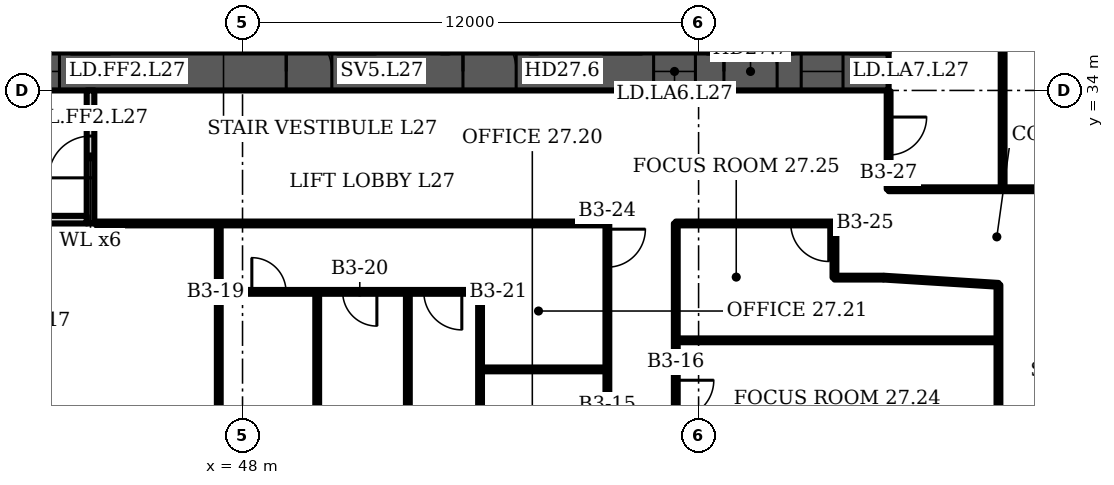
"""IFC4 building model, lengths in metres.
Left out: names, types, materials, properties, quantities, classifications, styles, units other than length and angle.
Written with IfcOpenShell. Run it as: python <this file> out.ifc"""

import sys

from ifc_helpers import new_model, si_unit, direction, frame, frame_2d, origin, place, context, subcontext, project, spatial, rectangle, extrude, element, fill, save


model = new_model("IFC4")
c1 = context("Model", 3, precision=1e-05, world=origin(), true_north=direction((0.0, 1.0)))
c2 = subcontext(c1, "Body", "Model", "MODEL_VIEW")
j1 = project(units=[si_unit("LENGTHUNIT", "METRE"), si_unit("PLANEANGLEUNIT", "RADIAN")], contexts=[c1])
p1 = place(None, origin())
s1 = spatial("IfcSite", under=j1, at=p1, CompositionType="ELEMENT")
p2 = place(p1, origin())
s2 = spatial("IfcBuilding", under=s1, at=p2, CompositionType="ELEMENT")
p3 = place(p2, frame((0.0, 0.0, 118.3)))
s3 = spatial("IfcBuildingStorey", under=s2, at=p3, CompositionType="ELEMENT", Elevation=118.3)
p4 = place(p3, frame((16.0, 34.5, 0.0), z_axis=(0.0, 0.0, 1.0), x_axis=(1.0, 0.0, 0.0)))
e1 = element("IfcWall", 1, at=p4, inside=s3, PredefinedType="SHEAR", context=c2, shape_type="SweptSolid", body=[
    extrude(rectangle(XDim=49.0, YDim=1.0, at=frame_2d((24.5, 0.0))), origin(), (0.0, 0.0, 1.0), 3.6),
])
p5 = place(p4, frame((1.2, 0.0, 0.0)))
e2 = element("IfcOpeningElement", 2, at=p5, cuts=e1, PredefinedType="OPENING", context=c2, shape_type="SweptSolid", body=[
    extrude(rectangle(XDim=1.1, YDim=2.1, at=frame_2d((0.55, 1.05))), frame((0.0, 0.51, 0.0), z_axis=(0.0, -1.0, 0.0), x_axis=(1.0, 0.0, 0.0)), (0.0, 0.0, 1.0), 1.02),
])
p6 = place(p4, frame((5.083, 0.0, 0.0)))
e3 = element("IfcOpeningElement", 3, at=p6, cuts=e1, PredefinedType="OPENING", context=c2, shape_type="SweptSolid", body=[
    extrude(rectangle(XDim=1.1, YDim=2.1, at=frame_2d((0.55, 1.05))), frame((0.0, 0.51, 0.0), z_axis=(0.0, -1.0, 0.0), x_axis=(1.0, 0.0, 0.0)), (0.0, 0.0, 1.0), 1.02),
])
p7 = place(p4, frame((2.933, 0.0, 0.0)))
e4 = element("IfcOpeningElement", 4, at=p7, cuts=e1, PredefinedType="OPENING", context=c2, shape_type="SweptSolid", body=[
    extrude(rectangle(XDim=1.4, YDim=2.1, at=frame_2d((0.7, 1.05))), frame((0.0, 0.51, 0.0), z_axis=(0.0, -1.0, 0.0), x_axis=(1.0, 0.0, 0.0)), (0.0, 0.0, 1.0), 1.02),
])
p8 = place(p4, frame((7.65, 0.0, 0.0)))
e5 = element("IfcOpeningElement", 5, at=p8, cuts=e1, PredefinedType="OPENING", context=c2, shape_type="SweptSolid", body=[
    extrude(rectangle(XDim=1.2, YDim=2.1, at=frame_2d((0.6, 1.05))), frame((0.0, 0.51, 0.0), z_axis=(0.0, -1.0, 0.0), x_axis=(1.0, 0.0, 0.0)), (0.0, 0.0, 1.0), 1.02),
])
p9 = place(p4, frame((14.817, 0.0, 0.0)))
e6 = element("IfcOpeningElement", 6, at=p9, cuts=e1, PredefinedType="OPENING", context=c2, shape_type="SweptSolid", body=[
    extrude(rectangle(XDim=1.1, YDim=2.1, at=frame_2d((0.55, 1.05))), frame((0.0, 0.51, 0.0), z_axis=(0.0, -1.0, 0.0), x_axis=(1.0, 0.0, 0.0)), (0.0, 0.0, 1.0), 1.02),
])
p10 = place(p4, frame((19.083, 0.0, 0.0)))
e7 = element("IfcOpeningElement", 7, at=p10, cuts=e1, PredefinedType="OPENING", context=c2, shape_type="SweptSolid", body=[
    extrude(rectangle(XDim=1.1, YDim=2.1, at=frame_2d((0.55, 1.05))), frame((0.0, 0.51, 0.0), z_axis=(0.0, -1.0, 0.0), x_axis=(1.0, 0.0, 0.0)), (0.0, 0.0, 1.0), 1.02),
])
p11 = place(p4, frame((16.8, 0.0, 0.0)))
e8 = element("IfcOpeningElement", 8, at=p11, cuts=e1, PredefinedType="OPENING", context=c2, shape_type="SweptSolid", body=[
    extrude(rectangle(XDim=1.4, YDim=2.1, at=frame_2d((0.7, 1.05))), frame((0.0, 0.51, 0.0), z_axis=(0.0, -1.0, 0.0), x_axis=(1.0, 0.0, 0.0)), (0.0, 0.0, 1.0), 1.02),
])
p12 = place(p4, frame((21.817, 0.0, 0.0)))
e9 = element("IfcOpeningElement", 9, at=p12, cuts=e1, PredefinedType="OPENING", context=c2, shape_type="SweptSolid", body=[
    extrude(rectangle(XDim=1.1, YDim=2.1, at=frame_2d((0.55, 1.05))), frame((0.0, 0.51, 0.0), z_axis=(0.0, -1.0, 0.0), x_axis=(1.0, 0.0, 0.0)), (0.0, 0.0, 1.0), 1.02),
])
p13 = place(p4, frame((26.083, 0.0, 0.0)))
e10 = element("IfcOpeningElement", 10, at=p13, cuts=e1, PredefinedType="OPENING", context=c2, shape_type="SweptSolid", body=[
    extrude(rectangle(XDim=1.1, YDim=2.1, at=frame_2d((0.55, 1.05))), frame((0.0, 0.51, 0.0), z_axis=(0.0, -1.0, 0.0), x_axis=(1.0, 0.0, 0.0)), (0.0, 0.0, 1.0), 1.02),
])
p14 = place(p4, frame((33.15, 0.0, 0.0)))
e11 = element("IfcOpeningElement", 11, at=p14, cuts=e1, PredefinedType="OPENING", context=c2, shape_type="SweptSolid", body=[
    extrude(rectangle(XDim=1.2, YDim=2.1, at=frame_2d((0.6, 1.05))), frame((0.0, 0.51, 0.0), z_axis=(0.0, -1.0, 0.0), x_axis=(1.0, 0.0, 0.0)), (0.0, 0.0, 1.0), 1.02),
])
p15 = place(p4, frame((37.8, 0.0, 0.0)))
e12 = element("IfcOpeningElement", 12, at=p15, cuts=e1, PredefinedType="OPENING", context=c2, shape_type="SweptSolid", body=[
    extrude(rectangle(XDim=1.4, YDim=2.1, at=frame_2d((0.7, 1.05))), frame((0.0, 0.51, 0.0), z_axis=(0.0, -1.0, 0.0), x_axis=(1.0, 0.0, 0.0)), (0.0, 0.0, 1.0), 1.02),
])
p16 = place(p4, frame((42.817, 0.0, 0.0)))
e13 = element("IfcOpeningElement", 13, at=p16, cuts=e1, PredefinedType="OPENING", context=c2, shape_type="SweptSolid", body=[
    extrude(rectangle(XDim=1.1, YDim=2.1, at=frame_2d((0.55, 1.05))), frame((0.0, 0.51, 0.0), z_axis=(0.0, -1.0, 0.0), x_axis=(1.0, 0.0, 0.0)), (0.0, 0.0, 1.0), 1.02),
])
p17 = place(p4, frame((46.7, 0.0, 0.0)))
e14 = element("IfcOpeningElement", 14, at=p17, cuts=e1, PredefinedType="OPENING", context=c2, shape_type="SweptSolid", body=[
    extrude(rectangle(XDim=1.1, YDim=2.1, at=frame_2d((0.55, 1.05))), frame((0.0, 0.51, 0.0), z_axis=(0.0, -1.0, 0.0), x_axis=(1.0, 0.0, 0.0)), (0.0, 0.0, 1.0), 1.02),
])
p18 = place(p4, frame((44.667, 0.0, 0.0)))
e15 = element("IfcOpeningElement", 15, at=p18, cuts=e1, PredefinedType="OPENING", context=c2, shape_type="SweptSolid", body=[
    extrude(rectangle(XDim=1.4, YDim=2.1, at=frame_2d((0.7, 1.05))), frame((0.0, 0.51, 0.0), z_axis=(0.0, -1.0, 0.0), x_axis=(1.0, 0.0, 0.0)), (0.0, 0.0, 1.0), 1.02),
])
p19 = place(p3, frame((44.0, 30.5, 0.0), z_axis=(0.0, 0.0, 1.0), x_axis=(0.0, 1.0, 0.0)))
e16 = element("IfcWall", 16, at=p19, inside=s3, PredefinedType="PARTITIONING", context=c2, shape_type="SweptSolid", body=[
    extrude(rectangle(XDim=3.5, YDim=0.2, at=frame_2d((1.75, 0.0))), origin(), (0.0, 0.0, 1.0), 3.2),
])
p20 = place(p19, frame((1.2, 0.0, 0.0)))
e17 = element("IfcOpeningElement", 17, at=p20, cuts=e16, PredefinedType="OPENING", context=c2, shape_type="SweptSolid", body=[
    extrude(rectangle(XDim=1.1, YDim=2.1, at=frame_2d((0.55, 1.05))), frame((0.0, 0.11, 0.0), z_axis=(0.0, -1.0, 0.0), x_axis=(1.0, 0.0, 0.0)), (0.0, 0.0, 1.0), 0.22),
])
p21 = place(p3, frame((41.1, 30.6, 0.0), z_axis=(0.0, 0.0, 1.0), x_axis=(1.0, 0.0, 0.0)))
e18 = element("IfcWall", 18, at=p21, inside=s3, PredefinedType="PARTITIONING", context=c2, shape_type="SweptSolid", body=[
    extrude(rectangle(XDim=2.8, YDim=0.2, at=frame_2d((1.4, 0.0))), origin(), (0.0, 0.0, 1.0), 3.2),
])
p22 = place(p3, frame((47.375, 15.13, 0.0), z_axis=(0.0, 0.0, 1.0), x_axis=(0.0, 1.0, 0.0)))
e19 = element("IfcWall", 19, at=p22, inside=s3, PredefinedType="PARTITIONING", context=c2, shape_type="SweptSolid", body=[
    extrude(rectangle(XDim=15.36, YDim=0.1, at=frame_2d((7.68, 0.0))), origin(), (0.0, 0.0, 1.0), 3.2),
])
p23 = place(p3, frame((47.375, 28.7, 0.0), z_axis=(0.0, 0.0, 1.0), x_axis=(1.0, 0.0, 0.0)))
e20 = element("IfcWall", 20, at=p23, inside=s3, PredefinedType="PARTITIONING", context=c2, shape_type="SweptSolid", body=[
    extrude(rectangle(XDim=6.875, YDim=0.1, at=frame_2d((3.438, 0.0))), origin(), (0.0, 0.0, 1.0), 3.2),
])
p24 = place(p23, frame((0.87, 0.0, 0.0)))
e21 = element("IfcOpeningElement", 21, at=p24, cuts=e20, PredefinedType="OPENING", context=c2, shape_type="SweptSolid", body=[
    extrude(rectangle(XDim=0.9, YDim=2.1, at=frame_2d((0.45, 1.05))), frame((0.0, 0.06, 0.0), z_axis=(0.0, -1.0, 0.0), x_axis=(1.0, 0.0, 0.0)), (0.0, 0.0, 1.0), 0.12),
])
p25 = place(p23, frame((3.26, 0.0, 0.0)))
e22 = element("IfcOpeningElement", 22, at=p25, cuts=e20, PredefinedType="OPENING", context=c2, shape_type="SweptSolid", body=[
    extrude(rectangle(XDim=0.9, YDim=2.1, at=frame_2d((0.45, 1.05))), frame((0.0, 0.06, 0.0), z_axis=(0.0, -1.0, 0.0), x_axis=(1.0, 0.0, 0.0)), (0.0, 0.0, 1.0), 0.12),
])
p26 = place(p23, frame((5.395, 0.0, 0.0)))
e23 = element("IfcOpeningElement", 23, at=p26, cuts=e20, PredefinedType="OPENING", context=c2, shape_type="SweptSolid", body=[
    extrude(rectangle(XDim=1.0, YDim=2.1, at=frame_2d((0.5, 1.05))), frame((0.0, 0.06, 0.0), z_axis=(0.0, -1.0, 0.0), x_axis=(1.0, 0.0, 0.0)), (0.0, 0.0, 1.0), 0.12),
])
for number, where, z_axis, x_axis in (
    (24, (49.965, 15.13, 0.0), (0.0, 0.0, 1.0), (0.0, 1.0, 0.0)),
    (25, (52.35, 15.13, 0.0), (0.0, 0.0, 1.0), (0.0, 1.0, 0.0)),
    (26, (54.25, 15.13, 0.0), (0.0, 0.0, 1.0), (0.0, 1.0, 0.0)),
):
    element("IfcWall", number, at=place(p3, frame(where, z_axis=z_axis, x_axis=x_axis)), inside=s3, PredefinedType="PARTITIONING", context=c2, shape_type="SweptSolid", body=[
        extrude(rectangle(XDim=13.57, YDim=0.1, at=frame_2d((6.785, 0.0))), origin(), (0.0, 0.0, 1.0), 3.2),
    ])
p27 = place(p3, frame((54.25, 26.66, 0.0), z_axis=(0.0, 0.0, 1.0), x_axis=(1.0, 0.0, 0.0)))
e27 = element("IfcWall", 27, at=p27, inside=s3, PredefinedType="PARTITIONING", context=c2, shape_type="SweptSolid", body=[
    extrude(rectangle(XDim=3.35, YDim=0.1, at=frame_2d((1.675, 0.0))), origin(), (0.0, 0.0, 1.0), 3.2),
])
p28 = place(p3, frame((57.6, -0.79, 0.0), z_axis=(0.0, 0.0, 1.0), x_axis=(0.0, 1.0, 0.0)))
e28 = element("IfcWall", 28, at=p28, inside=s3, PredefinedType="PARTITIONING", context=c2, shape_type="SweptSolid", body=[
    extrude(rectangle(XDim=31.29, YDim=0.1, at=frame_2d((15.645, 0.0))), origin(), (0.0, 0.0, 1.0), 2.58),
])
p29 = place(p28, frame((7.5, 0.0, 0.0)))
e29 = element("IfcOpeningElement", 29, at=p29, cuts=e28, PredefinedType="OPENING", context=c2, shape_type="SweptSolid", body=[
    extrude(rectangle(XDim=1.0, YDim=2.1, at=frame_2d((0.5, 1.05))), frame((0.0, 0.06, 0.0), z_axis=(0.0, -1.0, 0.0), x_axis=(1.0, 0.0, 0.0)), (0.0, 0.0, 1.0), 0.12),
])
p30 = place(p28, frame((17.344, 0.0, 0.0)))
e30 = element("IfcOpeningElement", 30, at=p30, cuts=e28, PredefinedType="OPENING", context=c2, shape_type="SweptSolid", body=[
    extrude(rectangle(XDim=1.0, YDim=2.1, at=frame_2d((0.5, 1.05))), frame((0.0, 0.06, 0.0), z_axis=(0.0, -1.0, 0.0), x_axis=(1.0, 0.0, 0.0)), (0.0, 0.0, 1.0), 0.12),
])
p31 = place(p28, frame((21.185, 0.0, 0.0)))
e31 = element("IfcOpeningElement", 31, at=p31, cuts=e28, PredefinedType="OPENING", context=c2, shape_type="SweptSolid", body=[
    extrude(rectangle(XDim=1.0, YDim=2.1, at=frame_2d((0.5, 1.05))), frame((0.0, 0.06, 0.0), z_axis=(0.0, -1.0, 0.0), x_axis=(1.0, 0.0, 0.0)), (0.0, 0.0, 1.0), 0.12),
])
p32 = place(p28, frame((25.03, 0.0, 0.0)))
e32 = element("IfcOpeningElement", 32, at=p32, cuts=e28, PredefinedType="OPENING", context=c2, shape_type="SweptSolid", body=[
    extrude(rectangle(XDim=1.0, YDim=2.1, at=frame_2d((0.5, 1.05))), frame((0.0, 0.06, 0.0), z_axis=(0.0, -1.0, 0.0), x_axis=(1.0, 0.0, 0.0)), (0.0, 0.0, 1.0), 0.12),
])
p33 = place(p28, frame((30.139, 0.0, 0.0)))
e33 = element("IfcOpeningElement", 33, at=p33, cuts=e28, PredefinedType="OPENING", context=c2, shape_type="SweptSolid", body=[
    extrude(rectangle(XDim=1.0, YDim=2.1, at=frame_2d((0.5, 1.05))), frame((0.0, 0.06, 0.0), z_axis=(0.0, -1.0, 0.0), x_axis=(1.0, 0.0, 0.0)), (0.0, 0.0, 1.0), 0.12),
])
p34 = place(p3, frame((59.4, 13.7, 0.0), z_axis=(0.0, 0.0, 1.0), x_axis=(0.0, 1.0, 0.0)))
e34 = element("IfcWall", 34, at=p34, inside=s3, PredefinedType="PARTITIONING", context=c2, shape_type="SweptSolid", body=[
    extrude(rectangle(XDim=16.8, YDim=0.1, at=frame_2d((8.4, 0.0))), origin(), (0.0, 0.0, 1.0), 3.2),
])
p35 = place(p34, frame((2.45, 0.0, 0.0)))
e35 = element("IfcOpeningElement", 35, at=p35, cuts=e34, PredefinedType="OPENING", context=c2, shape_type="SweptSolid", body=[
    extrude(rectangle(XDim=1.0, YDim=2.1, at=frame_2d((0.5, 1.05))), frame((0.0, 0.06, 0.0), z_axis=(0.0, -1.0, 0.0), x_axis=(1.0, 0.0, 0.0)), (0.0, 0.0, 1.0), 0.12),
])
p36 = place(p34, frame((7.125, 0.0, 0.0)))
e36 = element("IfcOpeningElement", 36, at=p36, cuts=e34, PredefinedType="OPENING", context=c2, shape_type="SweptSolid", body=[
    extrude(rectangle(XDim=1.0, YDim=2.1, at=frame_2d((0.5, 1.05))), frame((0.0, 0.06, 0.0), z_axis=(0.0, -1.0, 0.0), x_axis=(1.0, 0.0, 0.0)), (0.0, 0.0, 1.0), 0.12),
])
p37 = place(p34, frame((11.675, 0.0, 0.0)))
e37 = element("IfcOpeningElement", 37, at=p37, cuts=e34, PredefinedType="OPENING", context=c2, shape_type="SweptSolid", body=[
    extrude(rectangle(XDim=1.0, YDim=2.1, at=frame_2d((0.5, 1.05))), frame((0.0, 0.06, 0.0), z_axis=(0.0, -1.0, 0.0), x_axis=(1.0, 0.0, 0.0)), (0.0, 0.0, 1.0), 0.12),
])
p38 = place(p3, frame((59.4, 27.425, 0.0), z_axis=(0.0, 0.0, 1.0), x_axis=(1.0, 0.0, 0.0)))
e38 = element("IfcWall", 38, at=p38, inside=s3, PredefinedType="PARTITIONING", context=c2, shape_type="SweptSolid", body=[
    extrude(rectangle(XDim=8.49, YDim=0.1, at=frame_2d((4.245, 0.0))), origin(), (0.0, 0.0, 1.0), 3.2),
])
p39 = place(p3, frame((59.4, 30.5, 0.0), z_axis=(0.0, 0.0, 1.0), x_axis=(1.0, 0.0, 0.0)))
e39 = element("IfcWall", 39, at=p39, inside=s3, PredefinedType="PARTITIONING", context=c2, shape_type="SweptSolid", body=[
    extrude(rectangle(XDim=4.175, YDim=0.1, at=frame_2d((2.087, 0.0))), origin(), (0.0, 0.0, 1.0), 3.2),
])
p40 = place(p39, frame((3.025, 0.0, 0.0)))
e40 = element("IfcOpeningElement", 40, at=p40, cuts=e39, PredefinedType="OPENING", context=c2, shape_type="SweptSolid", body=[
    extrude(rectangle(XDim=1.0, YDim=2.1, at=frame_2d((0.5, 1.05))), frame((0.0, 0.06, 0.0), z_axis=(0.0, -1.0, 0.0), x_axis=(1.0, 0.0, 0.0)), (0.0, 0.0, 1.0), 0.12),
])
p41 = place(p3, frame((63.575, 29.075, 0.0), z_axis=(0.0, 0.0, 1.0), x_axis=(0.0, 1.0, 0.0)))
e41 = element("IfcWall", 41, at=p41, inside=s3, PredefinedType="PARTITIONING", context=c2, shape_type="SweptSolid", body=[
    extrude(rectangle(XDim=1.425, YDim=0.1, at=frame_2d((0.712, 0.0))), origin(), (0.0, 0.0, 1.0), 3.2),
])
p42 = place(p3, frame((63.575, 29.075, 0.0), z_axis=(0.0, 0.0, 1.0), x_axis=(1.0, 0.0, 0.0)))
e42 = element("IfcWall", 42, at=p42, inside=s3, PredefinedType="PARTITIONING", context=c2, shape_type="SweptSolid", body=[
    extrude(rectangle(XDim=1.285, YDim=0.1, at=frame_2d((0.643, 0.0))), origin(), (0.0, 0.0, 1.0), 3.2),
])
p43 = place(p3, frame((65.0, 31.4, 0.0), z_axis=(0.0, 0.0, 1.0), x_axis=(0.0, 1.0, 0.0)))
e43 = element("IfcWall", 43, at=p43, inside=s3, PredefinedType="PARTITIONING", context=c2, shape_type="SweptSolid", body=[
    extrude(rectangle(XDim=2.58, YDim=0.1, at=frame_2d((1.29, 0.0))), origin(), (0.0, 0.0, 1.0), 3.2),
])
p44 = place(p43, frame((0.9, 0.0, 0.0)))
e44 = element("IfcOpeningElement", 44, at=p44, cuts=e43, PredefinedType="OPENING", context=c2, shape_type="SweptSolid", body=[
    extrude(rectangle(XDim=1.0, YDim=2.1, at=frame_2d((0.5, 1.05))), frame((0.0, 0.06, 0.0), z_axis=(0.0, -1.0, 0.0), x_axis=(1.0, 0.0, 0.0)), (0.0, 0.0, 1.0), 0.12),
])
p45 = place(p3, frame((65.0, 31.4, 0.0), z_axis=(0.0, 0.0, 1.0), x_axis=(1.0, 0.0, 0.0)))
e45 = element("IfcWall", 45, at=p45, inside=s3, PredefinedType="PARTITIONING", context=c2, shape_type="SweptSolid", body=[
    extrude(rectangle(XDim=4.69, YDim=0.1, at=frame_2d((2.345, 0.0))), origin(), (0.0, 0.0, 1.0), 3.2),
])
p46 = place(p3, frame((67.89, 24.4, 0.0), z_axis=(0.0, 0.0, 1.0), x_axis=(0.0, 1.0, 0.0)))
e46 = element("IfcWall", 46, at=p46, inside=s3, PredefinedType="PARTITIONING", context=c2, shape_type="SweptSolid", body=[
    extrude(rectangle(XDim=4.485, YDim=0.1, at=frame_2d((2.243, 0.0))), origin(), (0.0, 0.0, 1.0), 3.2),
])
p47 = place(p3, frame((67.89, 28.885, 0.0), z_axis=(0.0, 0.0, 1.0), x_axis=(-0.998031, 0.062786, 0.0)))
e47 = element("IfcWall", 47, at=p47, inside=s3, PredefinedType="PARTITIONING", context=c2, shape_type="SweptSolid", body=[
    extrude(rectangle(XDim=3.021, YDim=0.1, at=frame_2d((1.511, 0.0))), origin(), (0.0, 0.0, 1.0), 3.2),
])
p48 = place(p3, frame((68.0, 31.4, 0.0), z_axis=(0.0, 0.0, 1.0), x_axis=(0.0, 1.0, 0.0)))
e48 = element("IfcWall", 48, at=p48, inside=s3, PredefinedType="PARTITIONING", context=c2, shape_type="SweptSolid", body=[
    extrude(rectangle(XDim=8.79, YDim=0.1, at=frame_2d((4.395, 0.0))), origin(), (0.0, 0.0, 1.0), 3.2),
])
p49 = place(p3, frame((44.15, 30.5, 0.0), z_axis=(0.0, 0.0, 1.0), x_axis=(1.0, 0.0, 0.0)))
e49 = element("IfcWall", 49, at=p49, inside=s3, PredefinedType="PARTITIONING", context=c2, shape_type="SweptSolid", body=[
    extrude(rectangle(XDim=13.45, YDim=0.1, at=frame_2d((6.725, 0.0))), origin(), (0.0, 0.0, 1.0), 3.2),
])
p50 = place(p13, origin())
e50 = element("IfcDoor", 50, at=p50, inside=s3, OperationType="DOUBLE_DOOR_SLIDING", PredefinedType="DOOR", context=c2, shape_type="SweptSolid", body=[
    extrude(rectangle(XDim=1.1, YDim=2.1, at=frame_2d((0.55, 1.05))), frame((0.0, 0.025, 0.0), z_axis=(0.0, -1.0, 0.0), x_axis=(1.0, 0.0, 0.0)), (0.0, 0.0, 1.0), 0.05),
])
fill(e10, e50)
p51 = place(p14, origin())
e51 = element("IfcDoor", 51, at=p51, inside=s3, OperationType="SINGLE_SWING_LEFT", PredefinedType="DOOR", context=c2, shape_type="SweptSolid", body=[
    extrude(rectangle(XDim=1.2, YDim=2.1, at=frame_2d((0.6, 1.05))), frame((0.0, 0.025, 0.0), z_axis=(0.0, -1.0, 0.0), x_axis=(1.0, 0.0, 0.0)), (0.0, 0.0, 1.0), 0.05),
])
fill(e11, e51)
p52 = place(p15, origin())
e52 = element("IfcDoor", 52, at=p52, inside=s3, OperationType="DOUBLE_DOOR_SINGLE_SWING", PredefinedType="DOOR", context=c2, shape_type="SweptSolid", body=[
    extrude(rectangle(XDim=1.4, YDim=2.1, at=frame_2d((0.7, 1.05))), frame((0.0, 0.025, 0.0), z_axis=(0.0, -1.0, 0.0), x_axis=(1.0, 0.0, 0.0)), (0.0, 0.0, 1.0), 0.05),
])
fill(e12, e52)
p53 = place(p16, origin())
e53 = element("IfcDoor", 53, at=p53, inside=s3, OperationType="DOUBLE_DOOR_SLIDING", PredefinedType="DOOR", context=c2, shape_type="SweptSolid", body=[
    extrude(rectangle(XDim=1.1, YDim=2.1, at=frame_2d((0.55, 1.05))), frame((0.0, 0.025, 0.0), z_axis=(0.0, -1.0, 0.0), x_axis=(1.0, 0.0, 0.0)), (0.0, 0.0, 1.0), 0.05),
])
fill(e13, e53)
p54 = place(p17, origin())
e54 = element("IfcDoor", 54, at=p54, inside=s3, OperationType="DOUBLE_DOOR_SLIDING", PredefinedType="DOOR", context=c2, shape_type="SweptSolid", body=[
    extrude(rectangle(XDim=1.1, YDim=2.1, at=frame_2d((0.55, 1.05))), frame((0.0, 0.025, 0.0), z_axis=(0.0, -1.0, 0.0), x_axis=(1.0, 0.0, 0.0)), (0.0, 0.0, 1.0), 0.05),
])
fill(e14, e54)
p55 = place(p18, origin())
e55 = element("IfcDoor", 55, at=p55, inside=s3, OperationType="DOUBLE_DOOR_SINGLE_SWING", PredefinedType="DOOR", context=c2, shape_type="SweptSolid", body=[
    extrude(rectangle(XDim=1.4, YDim=2.1, at=frame_2d((0.7, 1.05))), frame((0.0, 0.025, 0.0), z_axis=(0.0, -1.0, 0.0), x_axis=(1.0, 0.0, 0.0)), (0.0, 0.0, 1.0), 0.05),
])
fill(e15, e55)
p56 = place(p20, origin())
e56 = element("IfcDoor", 56, at=p56, inside=s3, OperationType="SINGLE_SWING_LEFT", PredefinedType="DOOR", context=c2, shape_type="SweptSolid", body=[
    extrude(rectangle(XDim=1.1, YDim=2.1, at=frame_2d((0.55, 1.05))), frame((0.0, 0.025, 0.0), z_axis=(0.0, -1.0, 0.0), x_axis=(1.0, 0.0, 0.0)), (0.0, 0.0, 1.0), 0.05),
])
fill(e17, e56)
p57 = place(p37, origin())
e57 = element("IfcDoor", 57, at=p57, inside=s3, OperationType="SINGLE_SWING_RIGHT", PredefinedType="DOOR", context=c2, shape_type="SweptSolid", body=[
    extrude(rectangle(XDim=1.0, YDim=2.1, at=frame_2d((0.5, 1.05))), frame((0.0, 0.025, 0.0), z_axis=(0.0, -1.0, 0.0), x_axis=(1.0, 0.0, 0.0)), (0.0, 0.0, 1.0), 0.05),
])
fill(e37, e57)
p58 = place(p24, origin())
e58 = element("IfcDoor", 58, at=p58, inside=s3, OperationType="SINGLE_SWING_LEFT", PredefinedType="DOOR", context=c2, shape_type="SweptSolid", body=[
    extrude(rectangle(XDim=0.9, YDim=2.1, at=frame_2d((0.45, 1.05))), frame((0.0, 0.025, 0.0), z_axis=(0.0, -1.0, 0.0), x_axis=(1.0, 0.0, 0.0)), (0.0, 0.0, 1.0), 0.05),
])
fill(e21, e58)
p59 = place(p25, origin())
e59 = element("IfcDoor", 59, at=p59, inside=s3, OperationType="SINGLE_SWING_RIGHT", PredefinedType="DOOR", context=c2, shape_type="SweptSolid", body=[
    extrude(rectangle(XDim=0.9, YDim=2.1, at=frame_2d((0.45, 1.05))), frame((0.0, 0.025, 0.0), z_axis=(0.0, -1.0, 0.0), x_axis=(1.0, 0.0, 0.0)), (0.0, 0.0, 1.0), 0.05),
])
fill(e22, e59)
p60 = place(p26, origin())
e60 = element("IfcDoor", 60, at=p60, inside=s3, OperationType="SINGLE_SWING_RIGHT", PredefinedType="DOOR", context=c2, shape_type="SweptSolid", body=[
    extrude(rectangle(XDim=1.0, YDim=2.1, at=frame_2d((0.5, 1.05))), frame((0.0, 0.025, 0.0), z_axis=(0.0, -1.0, 0.0), x_axis=(1.0, 0.0, 0.0)), (0.0, 0.0, 1.0), 0.05),
])
fill(e23, e60)
p61 = place(p33, origin())
e61 = element("IfcDoor", 61, at=p61, inside=s3, OperationType="SINGLE_SWING_RIGHT", PredefinedType="DOOR", context=c2, shape_type="SweptSolid", body=[
    extrude(rectangle(XDim=1.0, YDim=2.1, at=frame_2d((0.5, 1.05))), frame((0.0, 0.025, 0.0), z_axis=(0.0, -1.0, 0.0), x_axis=(1.0, 0.0, 0.0)), (0.0, 0.0, 1.0), 0.05),
])
fill(e33, e61)
p62 = place(p40, origin())
e62 = element("IfcDoor", 62, at=p62, inside=s3, OperationType="SINGLE_SWING_RIGHT", PredefinedType="DOOR", context=c2, shape_type="SweptSolid", body=[
    extrude(rectangle(XDim=1.0, YDim=2.1, at=frame_2d((0.5, 1.05))), frame((0.0, 0.025, 0.0), z_axis=(0.0, -1.0, 0.0), x_axis=(1.0, 0.0, 0.0)), (0.0, 0.0, 1.0), 0.05),
])
fill(e40, e62)
p63 = place(p44, origin())
e63 = element("IfcDoor", 63, at=p63, inside=s3, OperationType="SINGLE_SWING_RIGHT", PredefinedType="DOOR", context=c2, shape_type="SweptSolid", body=[
    extrude(rectangle(XDim=1.0, YDim=2.1, at=frame_2d((0.5, 1.05))), frame((0.0, 0.025, 0.0), z_axis=(0.0, -1.0, 0.0), x_axis=(1.0, 0.0, 0.0)), (0.0, 0.0, 1.0), 0.05),
])
fill(e44, e63)
save(model, sys.argv[1])
